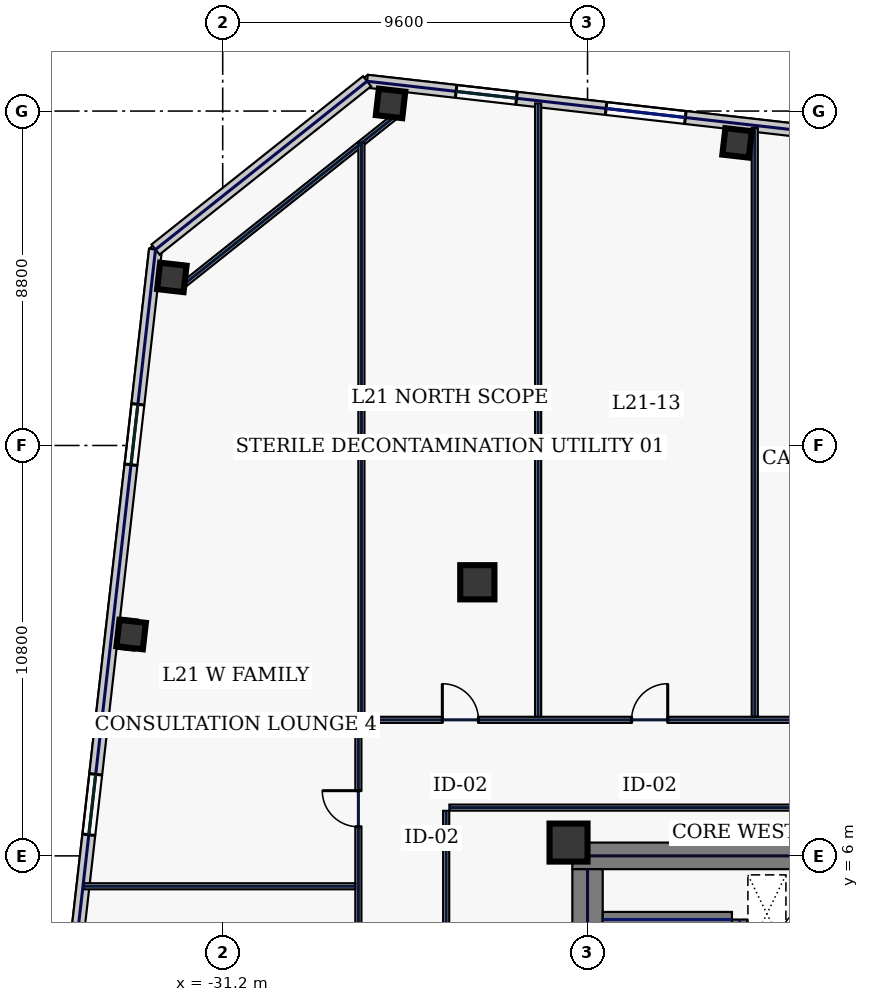
"""IFC4 building model, lengths in metres.
Left out: names, types, materials, properties, quantities, classifications, styles, units other than length and angle.
Written with IfcOpenShell. Run it as: python <this file> out.ifc"""

import sys

from ifc_helpers import new_model, si_unit, direction, frame, frame_2d, origin, origin_2d, place, context, subcontext, project, spatial, rectangle, hollow_rectangle, extrude, element, fill, save


model = new_model("IFC4")
c1 = context("Model", 3, precision=1e-05, world=origin(), true_north=direction((0.0, 1.0)))
c2 = subcontext(c1, "Body", "Model", "MODEL_VIEW")
j1 = project(units=[si_unit("LENGTHUNIT", "METRE"), si_unit("PLANEANGLEUNIT", "RADIAN")], contexts=[c1])
p1 = place(None, origin())
s1 = spatial("IfcSite", under=j1, at=p1, CompositionType="ELEMENT")
p2 = place(p1, origin())
s2 = spatial("IfcBuilding", under=s1, at=p2, CompositionType="ELEMENT")
p3 = place(p2, frame((0.0, 0.0, 97.4)))
s3 = spatial("IfcBuildingStorey", under=s2, at=p3, CompositionType="ELEMENT", Elevation=97.4)
p4 = place(p3, frame((-22.0, 6.0, 0.0), z_axis=(0.0, 0.0, 1.0), x_axis=(1.0, 0.0, 0.0)))
e1 = element("IfcWall", 1, at=p4, inside=s3, PredefinedType="SHEAR", context=c2, shape_type="SweptSolid", body=[
    extrude(rectangle(XDim=11.55, YDim=0.7, at=frame_2d((5.775, 0.0))), origin(), (0.0, 0.0, 1.0), 3.74),
])
p5 = place(p3, frame((-21.6, -5.65, 0.0), z_axis=(0.0, 0.0, 1.0), x_axis=(0.0, 1.0, 0.0)))
e2 = element("IfcWall", 2, at=p5, inside=s3, PredefinedType="SHEAR", context=c2, shape_type="SweptSolid", body=[
    extrude(rectangle(XDim=11.3, YDim=0.8, at=frame_2d((5.65, 0.0))), origin(), (0.0, 0.0, 1.0), 3.74),
])
p6 = place(p3, frame((-17.6, -4.325, 0.0), z_axis=(0.0, 0.0, 1.0), x_axis=(0.0, 1.0, 0.0)))
e3 = element("IfcWall", 3, at=p6, inside=s3, PredefinedType="SHEAR", context=c2, shape_type="SweptSolid", body=[
    extrude(rectangle(XDim=8.65, YDim=0.4, at=frame_2d((4.325, 0.0))), origin(), (0.0, 0.0, 1.0), 3.74),
])
p7 = place(p6, frame((0.25, 0.0, 0.0)))
e4 = element("IfcOpeningElement", 4, at=p7, cuts=e3, PredefinedType="OPENING", context=c2, shape_type="SweptSolid", body=[
    extrude(rectangle(XDim=1.1, YDim=2.2, at=frame_2d((0.55, 1.1))), frame((0.0, 0.21, 0.0), z_axis=(0.0, -1.0, 0.0), x_axis=(1.0, 0.0, 0.0)), (0.0, 0.0, 1.0), 0.42),
])
p8 = place(p3, frame((-21.2, 4.325, 0.0), z_axis=(0.0, 0.0, 1.0), x_axis=(1.0, 0.0, 0.0)))
e5 = element("IfcWall", 5, at=p8, inside=s3, PredefinedType="SHEAR", context=c2, shape_type="SweptSolid", body=[
    extrude(rectangle(XDim=3.4, YDim=0.4, at=frame_2d((1.7, 0.0))), origin(), (0.0, 0.0, 1.0), 3.74),
])
p9 = place(p3, frame((-22.1, 6.35, 0.0), z_axis=(0.0, 0.0, 1.0), x_axis=(1.0, 0.0, 0.0)))
e6 = element("IfcColumn", 6, at=p9, inside=s3, PredefinedType="COLUMN", context=c2, shape_type="SweptSolid", body=[
    extrude(hollow_rectangle(XDim=1.0, YDim=1.0, WallThickness=0.045, at=origin_2d()), origin(), (0.0, 0.0, 1.0), 3.74),
])
p10 = place(p3, frame((-24.5, 13.2, 0.0), z_axis=(0.0, 0.0, 1.0), x_axis=(1.0, 0.0, 0.0)))
e7 = element("IfcColumn", 7, at=p10, inside=s3, PredefinedType="COLUMN", context=c2, shape_type="SweptSolid", body=[
    extrude(hollow_rectangle(XDim=0.9, YDim=0.9, WallThickness=0.04, at=origin_2d()), origin(), (0.0, 0.0, 1.0), 3.74),
])
for number, where, z_axis, x_axis in (
    (8, (-17.665, 24.762, 0.0), (0.0, 0.0, 1.0), (0.994, -0.113, 0.0)),
    (9, (-26.783, 25.801, 0.0), (0.0, 0.0, 1.0), (0.994, -0.113, 0.0)),
    (10, (-32.538, 21.223, 0.0), (0.0, 0.0, 1.0), (0.994, -0.113, 0.0)),
    (11, (-33.609, 11.824, 0.0), (0.0, 0.0, 1.0), (0.994, -0.113, 0.0)),
):
    element("IfcColumn", number, at=place(p3, frame(where, z_axis=z_axis, x_axis=x_axis)), inside=s3, PredefinedType="COLUMN", context=c2, shape_type="SweptSolid", body=[
        extrude(hollow_rectangle(XDim=0.7, YDim=0.7, WallThickness=0.032, at=origin_2d()), origin(), (0.0, 0.0, 1.0), 3.74),
    ])
p11 = place(p3, frame((-6.314, 23.982, 0.0), z_axis=(0.0, 0.0, 1.0), x_axis=(-0.993571362037, 0.113207546299, 0.0)))
e12 = element("IfcWall", 12, at=p11, inside=s3, PredefinedType="STANDARD", context=c2, shape_type="SweptSolid", body=[
    extrude(rectangle(XDim=21.223, YDim=0.34, at=frame_2d((10.611, 0.0))), origin(), (0.0, 0.0, 1.0), 3.74),
])
p12 = place(p11, frame((17.265, 0.0, 0.22)))
e13 = element("IfcOpeningElement", 13, at=p12, cuts=e12, PredefinedType="OPENING", context=c2, shape_type="SweptSolid", body=[
    extrude(rectangle(XDim=1.6, YDim=1.2, at=frame_2d((0.8, 0.6))), frame((0.0, 0.18, 0.0), z_axis=(0.0, -1.0, 0.0), x_axis=(1.0, 0.0, 0.0)), (0.0, 0.0, 1.0), 0.36),
])
p13 = place(p11, frame((12.794, 0.0, 0.67)))
e14 = element("IfcOpeningElement", 14, at=p13, cuts=e12, PredefinedType="OPENING", context=c2, shape_type="SweptSolid", body=[
    extrude(rectangle(XDim=2.1, YDim=2.2, at=frame_2d((1.05, 1.1))), frame((0.0, 0.18, 0.0), z_axis=(0.0, -1.0, 0.0), x_axis=(1.0, 0.0, 0.0)), (0.0, 0.0, 1.0), 0.36),
])
p14 = place(p11, frame((7.838, 0.0, 0.67)))
e15 = element("IfcOpeningElement", 15, at=p14, cuts=e12, PredefinedType="OPENING", context=c2, shape_type="SweptSolid", body=[
    extrude(rectangle(XDim=2.1, YDim=2.2, at=frame_2d((1.05, 1.1))), frame((0.0, 0.18, 0.0), z_axis=(0.0, -1.0, 0.0), x_axis=(1.0, 0.0, 0.0)), (0.0, 0.0, 1.0), 0.36),
])
p15 = place(p11, frame((3.616, 0.0, 0.67)))
e16 = element("IfcOpeningElement", 16, at=p15, cuts=e12, PredefinedType="OPENING", context=c2, shape_type="SweptSolid", body=[
    extrude(rectangle(XDim=2.1, YDim=2.2, at=frame_2d((1.05, 1.1))), frame((0.0, 0.18, 0.0), z_axis=(0.0, -1.0, 0.0), x_axis=(1.0, 0.0, 0.0)), (0.0, 0.0, 1.0), 0.36),
])
p16 = place(p3, frame((-32.968, 21.957, 0.0), z_axis=(0.0, 0.0, 1.0), x_axis=(-0.113201605824, -0.993572038877, 0.0)))
e17 = element("IfcWall", 17, at=p16, inside=s3, PredefinedType="STANDARD", context=c2, shape_type="SweptSolid", body=[
    extrude(rectangle(XDim=39.2, YDim=0.34, at=frame_2d((19.6, 0.0))), origin(), (0.0, 0.0, 1.0), 3.74),
])
p17 = place(p16, frame((4.1, 0.0, 0.58)))
e18 = element("IfcOpeningElement", 18, at=p17, cuts=e17, PredefinedType="OPENING", context=c2, shape_type="SweptSolid", body=[
    extrude(rectangle(XDim=1.6, YDim=2.3, at=frame_2d((0.8, 1.15))), frame((0.0, 0.18, 0.0), z_axis=(0.0, -1.0, 0.0), x_axis=(1.0, 0.0, 0.0)), (0.0, 0.0, 1.0), 0.36),
])
p18 = place(p16, frame((13.9, 0.0, 0.58)))
e19 = element("IfcOpeningElement", 19, at=p18, cuts=e17, PredefinedType="OPENING", context=c2, shape_type="SweptSolid", body=[
    extrude(rectangle(XDim=1.6, YDim=2.3, at=frame_2d((0.8, 1.15))), frame((0.0, 0.18, 0.0), z_axis=(0.0, -1.0, 0.0), x_axis=(1.0, 0.0, 0.0)), (0.0, 0.0, 1.0), 0.36),
])
p19 = place(p16, frame((23.7, 0.0, 0.58)))
e20 = element("IfcOpeningElement", 20, at=p19, cuts=e17, PredefinedType="OPENING", context=c2, shape_type="SweptSolid", body=[
    extrude(rectangle(XDim=1.6, YDim=2.3, at=frame_2d((0.8, 1.15))), frame((0.0, 0.18, 0.0), z_axis=(0.0, -1.0, 0.0), x_axis=(1.0, 0.0, 0.0)), (0.0, 0.0, 1.0), 0.36),
])
p20 = place(p16, frame((33.5, 0.0, 0.58)))
e21 = element("IfcOpeningElement", 21, at=p20, cuts=e17, PredefinedType="OPENING", context=c2, shape_type="SweptSolid", body=[
    extrude(rectangle(XDim=1.6, YDim=2.3, at=frame_2d((0.8, 1.15))), frame((0.0, 0.18, 0.0), z_axis=(0.0, -1.0, 0.0), x_axis=(1.0, 0.0, 0.0)), (0.0, 0.0, 1.0), 0.36),
])
p21 = place(p3, frame((-27.401, 26.385, 0.0), z_axis=(0.0, 0.0, 1.0), x_axis=(-0.78261359446, -0.622507800567, 0.0)))
e22 = element("IfcWall", 22, at=p21, inside=s3, PredefinedType="STANDARD", context=c2, shape_type="SweptSolid", body=[
    extrude(rectangle(XDim=7.114, YDim=0.34, at=frame_2d((3.557, 0.0))), origin(), (0.0, 0.0, 1.0), 3.74),
])
p22 = place(p3, frame((-26.571, 25.535, 0.0), z_axis=(0.0, 0.0, 1.0), x_axis=(-0.782617962887, -0.622502308564, 0.0)))
e23 = element("IfcWall", 23, at=p22, inside=s3, PredefinedType="PARTITIONING", context=c2, shape_type="SweptSolid", body=[
    extrude(rectangle(XDim=7.354, YDim=0.16, at=frame_2d((3.677, 0.0))), origin(), (0.0, 0.0, 1.0), 3.74),
])
p23 = place(p3, frame((-27.63, -9.215, 0.0), z_axis=(0.0, 0.0, 1.0), x_axis=(0.0, 1.0, 0.0)))
e24 = element("IfcWall", 24, at=p23, inside=s3, PredefinedType="PARTITIONING", context=c2, shape_type="SweptSolid", body=[
    extrude(rectangle(XDim=18.63, YDim=0.16, at=frame_2d((9.315, 0.0))), origin(), (0.0, 0.0, 1.0), 3.74),
])
p24 = place(p23, frame((1.769, 0.0, 0.0)))
e25 = element("IfcOpeningElement", 25, at=p24, cuts=e24, PredefinedType="OPENING", context=c2, shape_type="SweptSolid", body=[
    extrude(rectangle(XDim=0.95, YDim=2.2, at=frame_2d((0.475, 1.1))), frame((0.0, 0.09, 0.0), z_axis=(0.0, -1.0, 0.0), x_axis=(1.0, 0.0, 0.0)), (0.0, 0.0, 1.0), 0.18),
])
p25 = place(p23, frame((6.55, 0.0, 0.0)))
e26 = element("IfcOpeningElement", 26, at=p25, cuts=e24, PredefinedType="OPENING", context=c2, shape_type="SweptSolid", body=[
    extrude(rectangle(XDim=0.95, YDim=2.2, at=frame_2d((0.475, 1.1))), frame((0.0, 0.09, 0.0), z_axis=(0.0, -1.0, 0.0), x_axis=(1.0, 0.0, 0.0)), (0.0, 0.0, 1.0), 0.18),
])
p26 = place(p23, frame((12.05, 0.0, 0.0)))
e27 = element("IfcOpeningElement", 27, at=p26, cuts=e24, PredefinedType="OPENING", context=c2, shape_type="SweptSolid", body=[
    extrude(rectangle(XDim=0.95, YDim=2.2, at=frame_2d((0.475, 1.1))), frame((0.0, 0.09, 0.0), z_axis=(0.0, -1.0, 0.0), x_axis=(1.0, 0.0, 0.0)), (0.0, 0.0, 1.0), 0.18),
])
p27 = place(p23, frame((15.981, 0.0, 0.0)))
e28 = element("IfcOpeningElement", 28, at=p27, cuts=e24, PredefinedType="OPENING", context=c2, shape_type="SweptSolid", body=[
    extrude(rectangle(XDim=0.95, YDim=2.2, at=frame_2d((0.475, 1.1))), frame((0.0, 0.09, 0.0), z_axis=(0.0, -1.0, 0.0), x_axis=(1.0, 0.0, 0.0)), (0.0, 0.0, 1.0), 0.18),
])
p28 = place(p3, frame((-27.465, 9.58, 0.0), z_axis=(0.0, 0.0, 1.0), x_axis=(1.0, 0.0, 0.0)))
e29 = element("IfcWall", 29, at=p28, inside=s3, PredefinedType="PARTITIONING", context=c2, shape_type="SweptSolid", body=[
    extrude(rectangle(XDim=41.7, YDim=0.16, at=frame_2d((20.85, 0.0))), origin(), (0.0, 0.0, 1.0), 3.74),
])
p29 = place(p28, frame((2.044, 0.0, 0.0)))
e30 = element("IfcOpeningElement", 30, at=p29, cuts=e29, PredefinedType="OPENING", context=c2, shape_type="SweptSolid", body=[
    extrude(rectangle(XDim=0.95, YDim=2.2, at=frame_2d((0.475, 1.1))), frame((0.0, 0.09, 0.0), z_axis=(0.0, -1.0, 0.0), x_axis=(1.0, 0.0, 0.0)), (0.0, 0.0, 1.0), 0.18),
])
p30 = place(p28, frame((7.025, 0.0, 0.0)))
e31 = element("IfcOpeningElement", 31, at=p30, cuts=e29, PredefinedType="OPENING", context=c2, shape_type="SweptSolid", body=[
    extrude(rectangle(XDim=0.95, YDim=2.2, at=frame_2d((0.475, 1.1))), frame((0.0, 0.09, 0.0), z_axis=(0.0, -1.0, 0.0), x_axis=(1.0, 0.0, 0.0)), (0.0, 0.0, 1.0), 0.18),
])
p31 = place(p28, frame((14.075, 0.0, 0.0)))
e32 = element("IfcOpeningElement", 32, at=p31, cuts=e29, PredefinedType="OPENING", context=c2, shape_type="SweptSolid", body=[
    extrude(rectangle(XDim=0.95, YDim=2.2, at=frame_2d((0.475, 1.1))), frame((0.0, 0.09, 0.0), z_axis=(0.0, -1.0, 0.0), x_axis=(1.0, 0.0, 0.0)), (0.0, 0.0, 1.0), 0.18),
])
p32 = place(p28, frame((22.475, 0.0, 0.0)))
e33 = element("IfcOpeningElement", 33, at=p32, cuts=e29, PredefinedType="OPENING", context=c2, shape_type="SweptSolid", body=[
    extrude(rectangle(XDim=1.05, YDim=2.2, at=frame_2d((0.525, 1.1))), frame((0.0, 0.09, 0.0), z_axis=(0.0, -1.0, 0.0), x_axis=(1.0, 0.0, 0.0)), (0.0, 0.0, 1.0), 0.18),
])
p33 = place(p28, frame((31.25, 0.0, 0.0)))
e34 = element("IfcOpeningElement", 34, at=p33, cuts=e29, PredefinedType="OPENING", context=c2, shape_type="SweptSolid", body=[
    extrude(rectangle(XDim=0.95, YDim=2.2, at=frame_2d((0.475, 1.1))), frame((0.0, 0.09, 0.0), z_axis=(0.0, -1.0, 0.0), x_axis=(1.0, 0.0, 0.0)), (0.0, 0.0, 1.0), 0.18),
])
p34 = place(p3, frame((-10.665, 7.27, 0.0), z_axis=(0.0, 0.0, 1.0), x_axis=(-1.0, 0.0, 0.0)))
e35 = element("IfcWall", 35, at=p34, inside=s3, PredefinedType="PARTITIONING", context=c2, shape_type="SweptSolid", body=[
    extrude(rectangle(XDim=14.57, YDim=0.16, at=frame_2d((7.285, 0.0))), origin(), (0.0, 0.0, 1.0), 3.74),
])
p35 = place(p3, frame((-25.32, 7.185, 0.0), z_axis=(0.0, 0.0, 1.0), x_axis=(0.0, -1.0, 0.0)))
e36 = element("IfcWall", 36, at=p35, inside=s3, PredefinedType="PARTITIONING", context=c2, shape_type="SweptSolid", body=[
    extrude(rectangle(XDim=14.17, YDim=0.16, at=frame_2d((7.085, 0.0))), origin(), (0.0, 0.0, 1.0), 3.74),
])
p36 = place(p3, frame((-27.55, 9.665, 0.0), z_axis=(0.0, 0.0, 1.0), x_axis=(0.0, 1.0, 0.0)))
e37 = element("IfcWall", 37, at=p36, inside=s3, PredefinedType="PARTITIONING", context=c2, shape_type="SweptSolid", body=[
    extrude(rectangle(XDim=15.109, YDim=0.16, at=frame_2d((7.554, 0.0))), origin(), (0.0, 0.0, 1.0), 3.74),
])
p37 = place(p3, frame((-22.9, 9.665, 0.0), z_axis=(0.0, 0.0, 1.0), x_axis=(0.0, 1.0, 0.0)))
e38 = element("IfcWall", 38, at=p37, inside=s3, PredefinedType="PARTITIONING", context=c2, shape_type="SweptSolid", body=[
    extrude(rectangle(XDim=16.136, YDim=0.16, at=frame_2d((8.068, 0.0))), origin(), (0.0, 0.0, 1.0), 3.74),
])
p38 = place(p3, frame((-17.2, 9.665, 0.0), z_axis=(0.0, 0.0, 1.0), x_axis=(0.0, 1.0, 0.0)))
e39 = element("IfcWall", 39, at=p38, inside=s3, PredefinedType="PARTITIONING", context=c2, shape_type="SweptSolid", body=[
    extrude(rectangle(XDim=15.487, YDim=0.16, at=frame_2d((7.744, 0.0))), origin(), (0.0, 0.0, 1.0), 3.74),
])
p39 = place(p3, frame((-34.857, 5.2, 0.0), z_axis=(0.0, 0.0, 1.0), x_axis=(1.0, 0.0, 0.0)))
e40 = element("IfcWall", 40, at=p39, inside=s3, PredefinedType="PARTITIONING", context=c2, shape_type="SweptSolid", body=[
    extrude(rectangle(XDim=7.142, YDim=0.16, at=frame_2d((3.571, 0.0))), origin(), (0.0, 0.0, 1.0), 3.74),
])
p40 = place(p12, origin())
e41 = element("IfcWindow", 41, at=p40, inside=s3, PartitioningType="SINGLE_PANEL", PredefinedType="WINDOW", context=c2, shape_type="SweptSolid", body=[
    extrude(rectangle(XDim=1.6, YDim=1.2, at=frame_2d((0.8, 0.6))), frame((0.0, 0.03, 0.0), z_axis=(0.0, -1.0, 0.0), x_axis=(1.0, 0.0, 0.0)), (0.0, 0.0, 1.0), 0.06),
])
fill(e13, e41)
p41 = place(p13, origin())
e42 = element("IfcWindow", 42, at=p41, inside=s3, PartitioningType="SINGLE_PANEL", PredefinedType="WINDOW", context=c2, shape_type="SweptSolid", body=[
    extrude(rectangle(XDim=2.1, YDim=2.2, at=frame_2d((1.05, 1.1))), frame((0.0, 0.03, 0.0), z_axis=(0.0, -1.0, 0.0), x_axis=(1.0, 0.0, 0.0)), (0.0, 0.0, 1.0), 0.06),
])
fill(e14, e42)
p42 = place(p17, origin())
e43 = element("IfcWindow", 43, at=p42, inside=s3, PartitioningType="SINGLE_PANEL", PredefinedType="WINDOW", context=c2, shape_type="SweptSolid", body=[
    extrude(rectangle(XDim=1.6, YDim=2.3, at=frame_2d((0.8, 1.15))), frame((0.0, 0.03, 0.0), z_axis=(0.0, -1.0, 0.0), x_axis=(1.0, 0.0, 0.0)), (0.0, 0.0, 1.0), 0.06),
])
fill(e18, e43)
p43 = place(p18, origin())
e44 = element("IfcWindow", 44, at=p43, inside=s3, PartitioningType="SINGLE_PANEL", PredefinedType="WINDOW", context=c2, shape_type="SweptSolid", body=[
    extrude(rectangle(XDim=1.6, YDim=2.3, at=frame_2d((0.8, 1.15))), frame((0.0, 0.03, 0.0), z_axis=(0.0, -1.0, 0.0), x_axis=(1.0, 0.0, 0.0)), (0.0, 0.0, 1.0), 0.06),
])
fill(e19, e44)
p44 = place(p29, origin())
e45 = element("IfcDoor", 45, at=p44, inside=s3, OperationType="SINGLE_SWING_LEFT", PredefinedType="DOOR", context=c2, shape_type="SweptSolid", body=[
    extrude(rectangle(XDim=0.95, YDim=2.2, at=frame_2d((0.475, 1.1))), frame((0.0, 0.025, 0.0), z_axis=(0.0, -1.0, 0.0), x_axis=(1.0, 0.0, 0.0)), (0.0, 0.0, 1.0), 0.05),
])
fill(e30, e45)
p45 = place(p30, origin())
e46 = element("IfcDoor", 46, at=p45, inside=s3, OperationType="SINGLE_SWING_RIGHT", PredefinedType="DOOR", context=c2, shape_type="SweptSolid", body=[
    extrude(rectangle(XDim=0.95, YDim=2.2, at=frame_2d((0.475, 1.1))), frame((0.0, 0.025, 0.0), z_axis=(0.0, -1.0, 0.0), x_axis=(1.0, 0.0, 0.0)), (0.0, 0.0, 1.0), 0.05),
])
fill(e31, e46)
p46 = place(p27, origin())
e47 = element("IfcDoor", 47, at=p46, inside=s3, OperationType="SINGLE_SWING_RIGHT", PredefinedType="DOOR", context=c2, shape_type="SweptSolid", body=[
    extrude(rectangle(XDim=0.95, YDim=2.2, at=frame_2d((0.475, 1.1))), frame((0.0, 0.025, 0.0), z_axis=(0.0, -1.0, 0.0), x_axis=(1.0, 0.0, 0.0)), (0.0, 0.0, 1.0), 0.05),
])
fill(e28, e47)
save(model, sys.argv[1])
